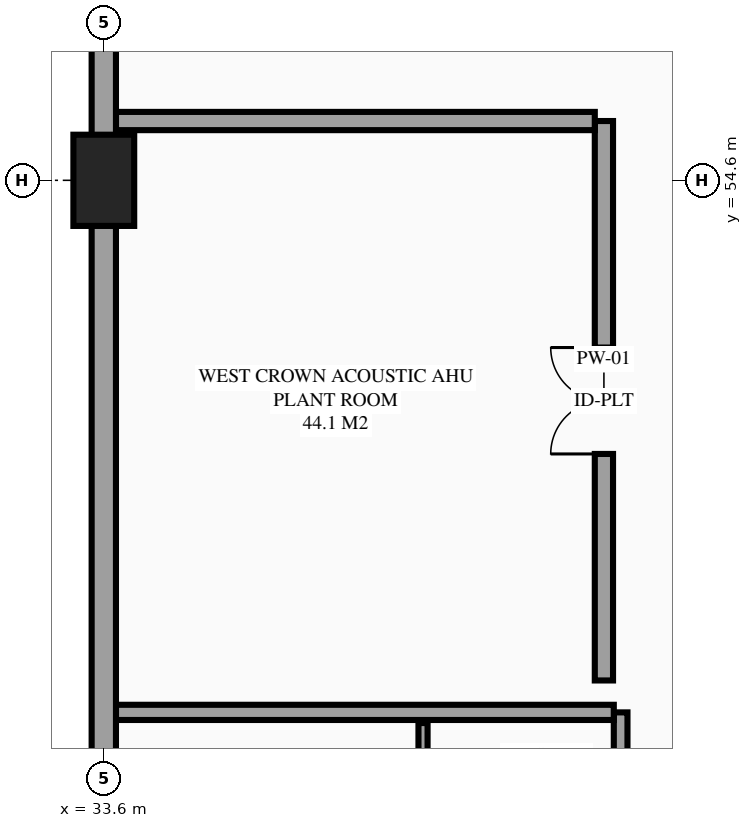
"""IFC4 building model, lengths in metres.
Left out: names, types, materials, properties, quantities, classifications, styles, units other than length and angle.
Written with IfcOpenShell. Run it as: python <this file> out.ifc"""

import sys

from ifc_helpers import new_model, si_unit, direction, frame, frame_2d, origin, origin_2d, place, context, subcontext, project, spatial, rectangle, extrude, element, fill, save


model = new_model("IFC4")
c1 = context("Model", 3, precision=1e-05, world=origin(), true_north=direction((0.0, 1.0)))
c2 = subcontext(c1, "Body", "Model", "MODEL_VIEW")
j1 = project(units=[si_unit("LENGTHUNIT", "METRE"), si_unit("PLANEANGLEUNIT", "RADIAN")], contexts=[c1])
p1 = place(None, origin())
s1 = spatial("IfcSite", under=j1, at=p1, CompositionType="ELEMENT")
p2 = place(p1, origin())
s2 = spatial("IfcBuilding", under=s1, at=p2, CompositionType="ELEMENT")
p3 = place(p2, frame((0.0, 0.0, 43.5)))
s3 = spatial("IfcBuildingStorey", under=s2, at=p3, CompositionType="ELEMENT", Elevation=43.5)
p4 = place(p3, frame((33.6, 54.6, 0.0), z_axis=(0.0, 0.0, 1.0), x_axis=(1.0, 0.0, 0.0)))
e1 = element("IfcColumn", 1, at=p4, inside=s3, PredefinedType="COLUMN", context=c2, shape_type="SweptSolid", body=[
    extrude(rectangle(XDim=0.8, YDim=1.2, at=origin_2d()), origin(), (0.0, 0.0, 1.0), 3.6),
])
p5 = place(p3, frame((40.4, 42.36, 0.0), z_axis=(0.0, 0.0, 1.0), x_axis=(0.0, 1.0, 0.0)))
e2 = element("IfcWall", 2, at=p5, inside=s3, PredefinedType="PARTITIONING", context=c2, shape_type="SweptSolid", body=[
    extrude(rectangle(XDim=5.24, YDim=0.18, at=frame_2d((2.62, 0.0))), origin(), (0.0, 0.0, 1.0), 3.355),
])
p6 = place(p5, frame((0.955, 0.0, 0.0)))
e3 = element("IfcOpeningElement", 3, at=p6, cuts=e2, PredefinedType="OPENING", context=c2, shape_type="SweptSolid", body=[
    extrude(rectangle(XDim=0.96, YDim=2.15, at=frame_2d((0.48, 1.075))), frame((0.0, 0.1, 0.0), z_axis=(0.0, -1.0, 0.0), x_axis=(1.0, 0.0, 0.0)), (0.0, 0.0, 1.0), 0.2),
])
p7 = place(p3, frame((33.76, 47.6, 0.0), z_axis=(0.0, 0.0, 1.0), x_axis=(1.0, 0.0, 0.0)))
e4 = element("IfcWall", 4, at=p7, inside=s3, PredefinedType="PARTITIONING", context=c2, shape_type="SweptSolid", body=[
    extrude(rectangle(XDim=6.55, YDim=0.2, at=frame_2d((3.275, 0.0))), origin(), (0.0, 0.0, 1.0), 3.355),
])
p8 = place(p3, frame((37.8, 45.27, 0.0), z_axis=(0.0, 0.0, 1.0), x_axis=(0.0, 1.0, 0.0)))
e5 = element("IfcWall", 5, at=p8, inside=s3, PredefinedType="PARTITIONING", context=c2, shape_type="SweptSolid", body=[
    extrude(rectangle(XDim=2.19, YDim=0.12, at=frame_2d((1.095, 0.0))), origin(), (0.0, 0.0, 1.0), 3.355),
])
p9 = place(p3, frame((40.18, 48.02, 0.0), z_axis=(0.0, 0.0, 1.0), x_axis=(0.0, 1.0, 0.0)))
e6 = element("IfcWall", 6, at=p9, inside=s3, PredefinedType="PARTITIONING", context=c2, shape_type="SweptSolid", body=[
    extrude(rectangle(XDim=7.36, YDim=0.24, at=frame_2d((3.68, 0.0))), origin(), (0.0, 0.0, 1.0), 3.355),
])
p10 = place(p9, frame((2.98, 0.0, 0.0)))
e7 = element("IfcOpeningElement", 7, at=p10, cuts=e6, PredefinedType="OPENING", context=c2, shape_type="SweptSolid", body=[
    extrude(rectangle(XDim=1.4, YDim=2.2, at=frame_2d((0.7, 1.1))), frame((0.0, 0.13, 0.0), z_axis=(0.0, -1.0, 0.0), x_axis=(1.0, 0.0, 0.0)), (0.0, 0.0, 1.0), 0.26),
])
p11 = place(p3, frame((33.76, 55.38, 0.0), z_axis=(0.0, 0.0, 1.0), x_axis=(1.0, 0.0, 0.0)))
e8 = element("IfcWall", 8, at=p11, inside=s3, PredefinedType="PARTITIONING", context=c2, shape_type="SweptSolid", body=[
    extrude(rectangle(XDim=6.3, YDim=0.24, at=frame_2d((3.15, 0.0))), origin(), (0.0, 0.0, 1.0), 3.355),
])
p12 = place(p3, frame((33.6, 63.0, 0.0), z_axis=(0.0, 0.0, 1.0), x_axis=(0.0, -1.0, 0.0)))
e9 = element("IfcWall", 9, at=p12, inside=s3, PredefinedType="STANDARD", context=c2, shape_type="SweptSolid", body=[
    extrude(rectangle(XDim=8.4, YDim=0.32, at=frame_2d((4.2, 0.0))), origin(), (0.0, 0.0, 1.0), 2.56),
])
p13 = place(p3, frame((33.6, 54.6, 0.0), z_axis=(0.0, 0.0, 1.0), x_axis=(0.0, -1.0, 0.0)))
e10 = element("IfcWall", 10, at=p13, inside=s3, PredefinedType="STANDARD", context=c2, shape_type="SweptSolid", body=[
    extrude(rectangle(XDim=16.8, YDim=0.32, at=frame_2d((8.4, 0.0))), origin(), (0.0, 0.0, 1.0), 2.46),
])
p14 = place(p13, frame((14.11, 0.0, 0.85)))
e11 = element("IfcOpeningElement", 11, at=p14, cuts=e10, PredefinedType="OPENING", context=c2, shape_type="SweptSolid", body=[
    extrude(rectangle(XDim=1.5, YDim=1.5, at=frame_2d((0.75, 0.75))), frame((0.0, 0.17, 0.0), z_axis=(0.0, -1.0, 0.0), x_axis=(1.0, 0.0, 0.0)), (0.0, 0.0, 1.0), 0.34),
])
p15 = place(p13, frame((9.02, 0.0, 0.85)))
e12 = element("IfcOpeningElement", 12, at=p15, cuts=e10, PredefinedType="OPENING", context=c2, shape_type="SweptSolid", body=[
    extrude(rectangle(XDim=1.2, YDim=1.5, at=frame_2d((0.6, 0.75))), frame((0.0, 0.17, 0.0), z_axis=(0.0, -1.0, 0.0), x_axis=(1.0, 0.0, 0.0)), (0.0, 0.0, 1.0), 0.34),
])
p16 = place(p10, origin())
e13 = element("IfcDoor", 13, at=p16, inside=s3, OperationType="DOUBLE_DOOR_SINGLE_SWING", PredefinedType="DOOR", context=c2, shape_type="SweptSolid", body=[
    extrude(rectangle(XDim=1.4, YDim=2.2, at=frame_2d((0.7, 1.1))), frame((0.0, 0.025, 0.0), z_axis=(0.0, -1.0, 0.0), x_axis=(1.0, 0.0, 0.0)), (0.0, 0.0, 1.0), 0.05),
])
fill(e7, e13)
save(model, sys.argv[1])
